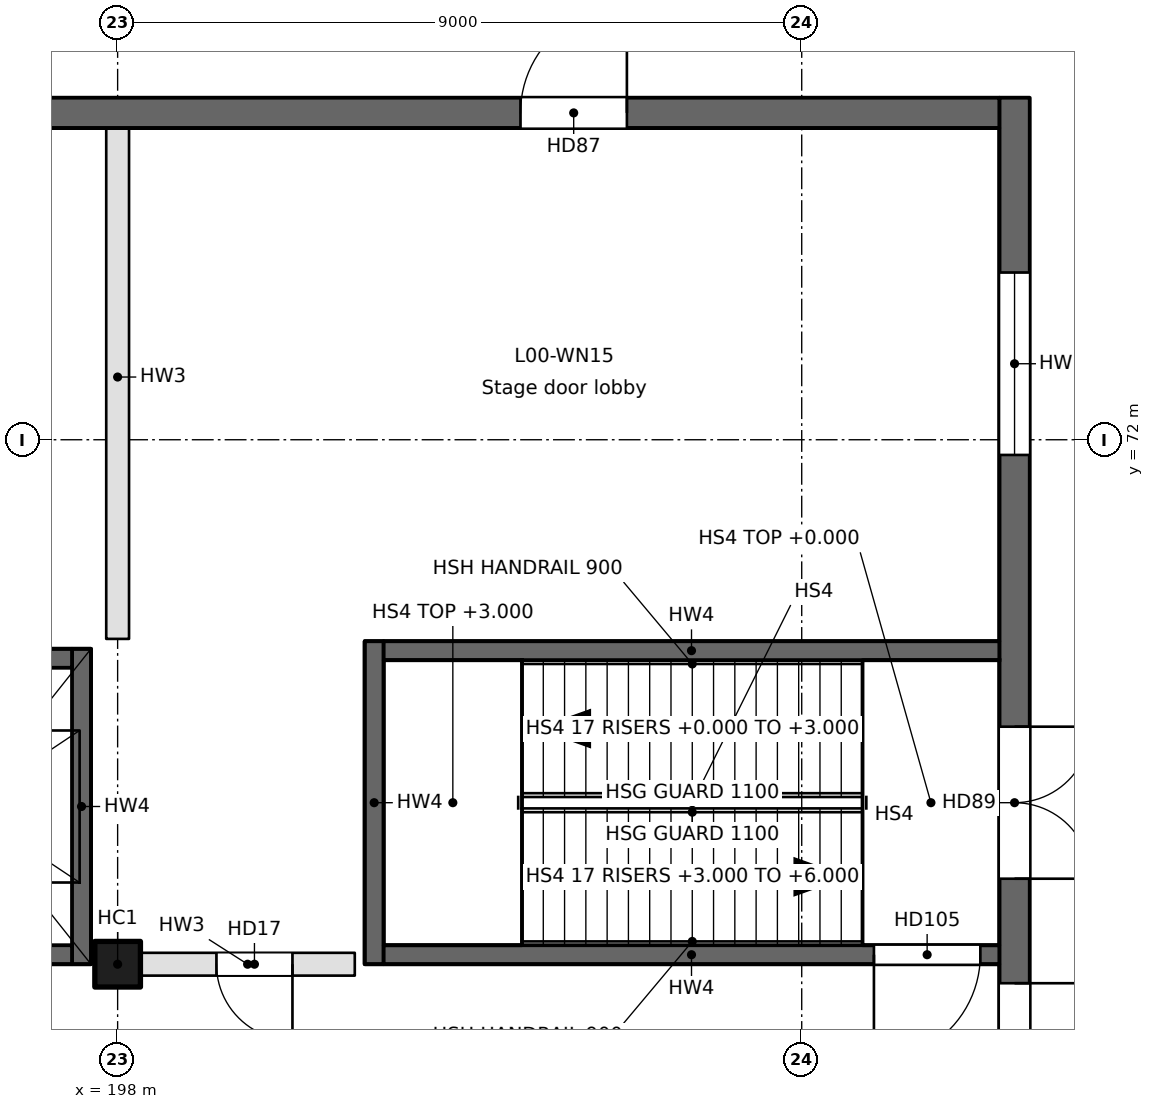
"""IFC4 building model, lengths in metres.
Left out: names, types, materials, properties, quantities, classifications, styles, units other than length and angle.
Written with IfcOpenShell. Run it as: python <this file> out.ifc"""

import sys

from ifc_helpers import new_model, si_unit, direction, frame, frame_2d, origin, origin_2d, place, context, subcontext, project, spatial, rectangle, extrude, element, fill, save


model = new_model("IFC4")
c1 = context("Model", 3, precision=1e-05, world=origin(), true_north=direction((0.0, 1.0)))
c2 = subcontext(c1, "Body", "Model", "MODEL_VIEW")
j1 = project(units=[si_unit("LENGTHUNIT", "METRE"), si_unit("PLANEANGLEUNIT", "RADIAN")], contexts=[c1])
p1 = place(None, origin())
s1 = spatial("IfcSite", under=j1, at=p1, CompositionType="ELEMENT")
p2 = place(p1, origin())
s2 = spatial("IfcBuilding", under=s1, at=p2, CompositionType="ELEMENT")
p3 = place(p2, origin())
s3 = spatial("IfcBuildingStorey", under=s2, at=p3, CompositionType="ELEMENT", Elevation=0.0)
p4 = place(p3, frame((198.0, 65.1, -1.8), z_axis=(0.0, 0.0, 1.0), x_axis=(1.0, 0.0, 0.0)))
e1 = element("IfcColumn", 1, at=p4, inside=s3, PredefinedType="COLUMN", context=c2, shape_type="SweptSolid", body=[
    extrude(rectangle(XDim=0.6, YDim=0.6, at=origin_2d()), origin(), (0.0, 0.0, 1.0), 7.8),
])
p5 = place(p3, frame((209.8, 76.5, -1.8), z_axis=(0.0, 0.0, 1.0), x_axis=(0.0, -1.0, 0.0)))
e2 = element("IfcWall", 2, at=p5, inside=s3, PredefinedType="SOLIDWALL", context=c2, shape_type="SweptSolid", body=[
    extrude(rectangle(XDim=54.0, YDim=0.4, at=frame_2d((27.0, 0.0))), origin(), (0.0, 0.0, 1.0), 7.45),
])
p6 = place(p5, frame((43.725, 0.0, 1.8)))
e3 = element("IfcOpeningElement", 3, at=p6, cuts=e2, PredefinedType="OPENING", context=c2, shape_type="SweptSolid", body=[
    extrude(rectangle(XDim=2.0, YDim=2.1, at=frame_2d((1.0, 1.05))), frame((0.0, 0.2, 0.0), z_axis=(0.0, -1.0, 0.0), x_axis=(1.0, 0.0, 0.0)), (0.0, 0.0, 1.0), 0.4),
])
p7 = place(p5, frame((8.275, 0.0, 1.8)))
e4 = element("IfcOpeningElement", 4, at=p7, cuts=e2, PredefinedType="OPENING", context=c2, shape_type="SweptSolid", body=[
    extrude(rectangle(XDim=2.0, YDim=2.1, at=frame_2d((1.0, 1.05))), frame((0.0, 0.2, 0.0), z_axis=(0.0, -1.0, 0.0), x_axis=(1.0, 0.0, 0.0)), (0.0, 0.0, 1.0), 0.4),
])
p8 = place(p5, frame((40.35, 0.0, 1.8)))
e5 = element("IfcOpeningElement", 5, at=p8, cuts=e2, PredefinedType="OPENING", context=c2, shape_type="SweptSolid", body=[
    extrude(rectangle(XDim=2.0, YDim=2.1, at=frame_2d((1.0, 1.05))), frame((0.0, 0.2, 0.0), z_axis=(0.0, -1.0, 0.0), x_axis=(1.0, 0.0, 0.0)), (0.0, 0.0, 1.0), 0.4),
])
p9 = place(p5, frame((11.65, 0.0, 1.8)))
e6 = element("IfcOpeningElement", 6, at=p9, cuts=e2, PredefinedType="OPENING", context=c2, shape_type="SweptSolid", body=[
    extrude(rectangle(XDim=2.0, YDim=2.1, at=frame_2d((1.0, 1.05))), frame((0.0, 0.2, 0.0), z_axis=(0.0, -1.0, 0.0), x_axis=(1.0, 0.0, 0.0)), (0.0, 0.0, 1.0), 0.4),
])
p10 = place(p5, frame((24.9, 0.0, 1.8)))
e7 = element("IfcOpeningElement", 7, at=p10, cuts=e2, PredefinedType="OPENING", context=c2, shape_type="SweptSolid", body=[
    extrude(rectangle(XDim=4.2, YDim=4.2, at=frame_2d((2.1, 2.1))), frame((0.0, 0.2, 0.0), z_axis=(0.0, -1.0, 0.0), x_axis=(1.0, 0.0, 0.0)), (0.0, 0.0, 1.0), 0.4),
])
p11 = place(p5, frame((49.3, 0.0, 2.7)))
e8 = element("IfcOpeningElement", 8, at=p11, cuts=e2, PredefinedType="OPENING", context=c2, shape_type="SweptSolid", body=[
    extrude(rectangle(XDim=2.4, YDim=1.8, at=frame_2d((1.2, 0.9))), frame((0.0, 0.2, 0.0), z_axis=(0.0, -1.0, 0.0), x_axis=(1.0, 0.0, 0.0)), (0.0, 0.0, 1.0), 0.4),
])
p12 = place(p5, frame((2.3, 0.0, 2.7)))
e9 = element("IfcOpeningElement", 9, at=p12, cuts=e2, PredefinedType="OPENING", context=c2, shape_type="SweptSolid", body=[
    extrude(rectangle(XDim=2.4, YDim=1.8, at=frame_2d((1.2, 0.9))), frame((0.0, 0.2, 0.0), z_axis=(0.0, -1.0, 0.0), x_axis=(1.0, 0.0, 0.0)), (0.0, 0.0, 1.0), 0.4),
])
p13 = place(p3, frame((150.4, 76.3, -1.8), z_axis=(0.0, 0.0, 1.0), x_axis=(1.0, 0.0, 0.0)))
e10 = element("IfcWall", 10, at=p13, inside=s3, PredefinedType="SOLIDWALL", context=c2, shape_type="SweptSolid", body=[
    extrude(rectangle(XDim=59.2, YDim=0.4, at=frame_2d((29.6, 0.0))), origin(), (0.0, 0.0, 1.0), 7.45),
])
p14 = place(p13, frame((0.875, 0.0, 1.8)))
e11 = element("IfcOpeningElement", 11, at=p14, cuts=e10, PredefinedType="OPENING", context=c2, shape_type="SweptSolid", body=[
    extrude(rectangle(XDim=2.0, YDim=2.1, at=frame_2d((1.0, 1.05))), frame((0.0, 0.2, 0.0), z_axis=(0.0, -1.0, 0.0), x_axis=(1.0, 0.0, 0.0)), (0.0, 0.0, 1.0), 0.4),
])
p15 = place(p13, frame((41.0, 0.0, 1.8)))
e12 = element("IfcOpeningElement", 12, at=p15, cuts=e10, PredefinedType="OPENING", context=c2, shape_type="SweptSolid", body=[
    extrude(rectangle(XDim=4.2, YDim=4.2, at=frame_2d((2.1, 2.1))), frame((0.0, 0.2, 0.0), z_axis=(0.0, -1.0, 0.0), x_axis=(1.0, 0.0, 0.0)), (0.0, 0.0, 1.0), 0.4),
])
p16 = place(p13, frame((52.9, 0.0, 1.8)))
e13 = element("IfcOpeningElement", 13, at=p16, cuts=e10, PredefinedType="OPENING", context=c2, shape_type="SweptSolid", body=[
    extrude(rectangle(XDim=1.4, YDim=2.1, at=frame_2d((0.7, 1.05))), frame((0.0, 0.2, 0.0), z_axis=(0.0, -1.0, 0.0), x_axis=(1.0, 0.0, 0.0)), (0.0, 0.0, 1.0), 0.4),
])
p17 = place(p13, frame((8.1, 0.0, 2.7)))
e14 = element("IfcOpeningElement", 14, at=p17, cuts=e10, PredefinedType="OPENING", context=c2, shape_type="SweptSolid", body=[
    extrude(rectangle(XDim=2.4, YDim=1.8, at=frame_2d((1.2, 0.9))), frame((0.0, 0.2, 0.0), z_axis=(0.0, -1.0, 0.0), x_axis=(1.0, 0.0, 0.0)), (0.0, 0.0, 1.0), 0.4),
])
p18 = place(p13, frame((18.4, 0.0, 2.7)))
e15 = element("IfcOpeningElement", 15, at=p18, cuts=e10, PredefinedType="OPENING", context=c2, shape_type="SweptSolid", body=[
    extrude(rectangle(XDim=2.4, YDim=1.8, at=frame_2d((1.2, 0.9))), frame((0.0, 0.2, 0.0), z_axis=(0.0, -1.0, 0.0), x_axis=(1.0, 0.0, 0.0)), (0.0, 0.0, 1.0), 0.4),
])
p19 = place(p13, frame((24.9, 0.0, 2.7)))
e16 = element("IfcOpeningElement", 16, at=p19, cuts=e10, PredefinedType="OPENING", context=c2, shape_type="SweptSolid", body=[
    extrude(rectangle(XDim=2.4, YDim=1.8, at=frame_2d((1.2, 0.9))), frame((0.0, 0.2, 0.0), z_axis=(0.0, -1.0, 0.0), x_axis=(1.0, 0.0, 0.0)), (0.0, 0.0, 1.0), 0.4),
])
p20 = place(p13, frame((30.9, 0.0, 2.7)))
e17 = element("IfcOpeningElement", 17, at=p20, cuts=e10, PredefinedType="OPENING", context=c2, shape_type="SweptSolid", body=[
    extrude(rectangle(XDim=2.4, YDim=1.8, at=frame_2d((1.2, 0.9))), frame((0.0, 0.2, 0.0), z_axis=(0.0, -1.0, 0.0), x_axis=(1.0, 0.0, 0.0)), (0.0, 0.0, 1.0), 0.4),
])
p21 = place(p3, frame((198.0, 69.38, 0.0), z_axis=(0.0, 0.0, 1.0), x_axis=(0.0, 1.0, 0.0)))
e18 = element("IfcWall", 18, at=p21, inside=s3, PredefinedType="PARTITIONING", context=c2, shape_type="SweptSolid", body=[
    extrude(rectangle(XDim=6.89, YDim=0.3, at=frame_2d((3.445, 0.0))), origin(), (0.0, 0.0, 1.0), 5.65),
])
p22 = place(p3, frame((201.12, 65.1, 0.0), z_axis=(0.0, 0.0, 1.0), x_axis=(-1.0, 0.0, 0.0)))
e19 = element("IfcWall", 19, at=p22, inside=s3, PredefinedType="PARTITIONING", context=c2, shape_type="SweptSolid", body=[
    extrude(rectangle(XDim=2.82, YDim=0.3, at=frame_2d((1.41, 0.0))), origin(), (0.0, 0.0, 1.0), 5.65),
])
p23 = place(p22, frame((0.82, 0.0, 0.0)))
e20 = element("IfcOpeningElement", 20, at=p23, cuts=e19, PredefinedType="OPENING", context=c2, shape_type="SweptSolid", body=[
    extrude(rectangle(XDim=1.0, YDim=2.1, at=frame_2d((0.5, 1.05))), frame((0.0, 0.15, 0.0), z_axis=(0.0, -1.0, 0.0), x_axis=(1.0, 0.0, 0.0)), (0.0, 0.0, 1.0), 0.3),
])
p24 = place(p3, frame((201.375, 65.1, -1.8), z_axis=(0.0, 0.0, 1.0), x_axis=(0.0, 1.0, 0.0)))
e21 = element("IfcWall", 21, at=p24, inside=s3, PredefinedType="SOLIDWALL", context=c2, shape_type="SweptSolid", body=[
    extrude(rectangle(XDim=4.25, YDim=0.25, at=frame_2d((2.125, 0.0))), origin(), (0.0, 0.0, 1.0), 7.45),
])
p25 = place(p3, frame((209.6, 65.225, -1.8), z_axis=(0.0, 0.0, 1.0), x_axis=(-1.0, 0.0, 0.0)))
e22 = element("IfcWall", 22, at=p25, inside=s3, PredefinedType="SOLIDWALL", context=c2, shape_type="SweptSolid", body=[
    extrude(rectangle(XDim=8.1, YDim=0.25, at=frame_2d((4.05, 0.0))), origin(), (0.0, 0.0, 1.0), 7.45),
])
p26 = place(p25, frame((0.25, 0.0, 1.8)))
e23 = element("IfcOpeningElement", 23, at=p26, cuts=e22, PredefinedType="OPENING", context=c2, shape_type="SweptSolid", body=[
    extrude(rectangle(XDim=1.4, YDim=2.1, at=frame_2d((0.7, 1.05))), frame((0.0, 0.125, 0.0), z_axis=(0.0, -1.0, 0.0), x_axis=(1.0, 0.0, 0.0)), (0.0, 0.0, 1.0), 0.25),
])
p27 = place(p3, frame((201.5, 69.225, -1.8), z_axis=(0.0, 0.0, 1.0), x_axis=(1.0, 0.0, 0.0)))
e24 = element("IfcWall", 24, at=p27, inside=s3, PredefinedType="SOLIDWALL", context=c2, shape_type="SweptSolid", body=[
    extrude(rectangle(XDim=8.1, YDim=0.25, at=frame_2d((4.05, 0.0))), origin(), (0.0, 0.0, 1.0), 7.45),
])
p28 = place(p3, frame((197.525, 69.25, -1.8), z_axis=(0.0, 0.0, 1.0), x_axis=(0.0, -1.0, 0.0)))
e25 = element("IfcWall", 25, at=p28, inside=s3, PredefinedType="SOLIDWALL", context=c2, shape_type="SweptSolid", body=[
    extrude(rectangle(XDim=4.15, YDim=0.25, at=frame_2d((2.075, 0.0))), origin(), (0.0, 0.0, 1.0), 7.45),
])
for number, where, z_axis, x_axis in (
    (26, (197.4, 65.225, -1.8), (0.0, 0.0, 1.0), (-1.0, 0.0, 0.0)),
    (27, (194.6, 69.125, -1.8), (0.0, 0.0, 1.0), (1.0, 0.0, 0.0)),
):
    element("IfcWall", number, at=place(p3, frame(where, z_axis=z_axis, x_axis=x_axis)), inside=s3, PredefinedType="SOLIDWALL", context=c2, shape_type="SweptSolid", body=[
        extrude(rectangle(XDim=2.8, YDim=0.25, at=frame_2d((1.4, 0.0))), origin(), (0.0, 0.0, 1.0), 7.45),
    ])
p29 = place(p23, origin())
e28 = element("IfcDoor", 28, at=p29, inside=s3, OperationType="SINGLE_SWING_LEFT", PredefinedType="DOOR", context=c2, shape_type="SweptSolid", body=[
    extrude(rectangle(XDim=1.0, YDim=2.1, at=frame_2d((0.5, 1.05))), frame((0.0, 0.025, 0.0), z_axis=(0.0, -1.0, 0.0), x_axis=(1.0, 0.0, 0.0)), (0.0, 0.0, 1.0), 0.05),
])
fill(e20, e28)
p30 = place(p16, origin())
e29 = element("IfcDoor", 29, at=p30, inside=s3, OperationType="SINGLE_SWING_RIGHT", PredefinedType="DOOR", context=c2, shape_type="SweptSolid", body=[
    extrude(rectangle(XDim=1.4, YDim=2.1, at=frame_2d((0.7, 1.05))), frame((0.0, 0.025, 0.0), z_axis=(0.0, -1.0, 0.0), x_axis=(1.0, 0.0, 0.0)), (0.0, 0.0, 1.0), 0.05),
])
fill(e13, e29)
p31 = place(p7, origin())
e30 = element("IfcDoor", 30, at=p31, inside=s3, OperationType="DOUBLE_DOOR_SINGLE_SWING", PredefinedType="DOOR", context=c2, shape_type="SweptSolid", body=[
    extrude(rectangle(XDim=2.0, YDim=2.1, at=frame_2d((1.0, 1.05))), frame((0.0, 0.025, 0.0), z_axis=(0.0, -1.0, 0.0), x_axis=(1.0, 0.0, 0.0)), (0.0, 0.0, 1.0), 0.05),
])
fill(e4, e30)
p32 = place(p9, origin())
e31 = element("IfcDoor", 31, at=p32, inside=s3, OperationType="DOUBLE_DOOR_SINGLE_SWING", PredefinedType="DOOR", context=c2, shape_type="SweptSolid", body=[
    extrude(rectangle(XDim=2.0, YDim=2.1, at=frame_2d((1.0, 1.05))), frame((0.0, 0.025, 0.0), z_axis=(0.0, -1.0, 0.0), x_axis=(1.0, 0.0, 0.0)), (0.0, 0.0, 1.0), 0.05),
])
fill(e6, e31)
p33 = place(p12, origin())
e32 = element("IfcWindow", 32, at=p33, inside=s3, PartitioningType="SINGLE_PANEL", PredefinedType="WINDOW", context=c2, shape_type="SweptSolid", body=[
    extrude(rectangle(XDim=2.4, YDim=1.8, at=frame_2d((1.2, 0.9))), frame((0.0, 0.03, 0.0), z_axis=(0.0, -1.0, 0.0), x_axis=(1.0, 0.0, 0.0)), (0.0, 0.0, 1.0), 0.06),
])
fill(e9, e32)
p34 = place(p26, origin())
e33 = element("IfcDoor", 33, at=p34, inside=s3, OperationType="SINGLE_SWING_RIGHT", PredefinedType="DOOR", context=c2, shape_type="SweptSolid", body=[
    extrude(rectangle(XDim=1.4, YDim=2.1, at=frame_2d((0.7, 1.05))), frame((0.0, 0.025, 0.0), z_axis=(0.0, -1.0, 0.0), x_axis=(1.0, 0.0, 0.0)), (0.0, 0.0, 1.0), 0.05),
])
fill(e23, e33)
save(model, sys.argv[1])
